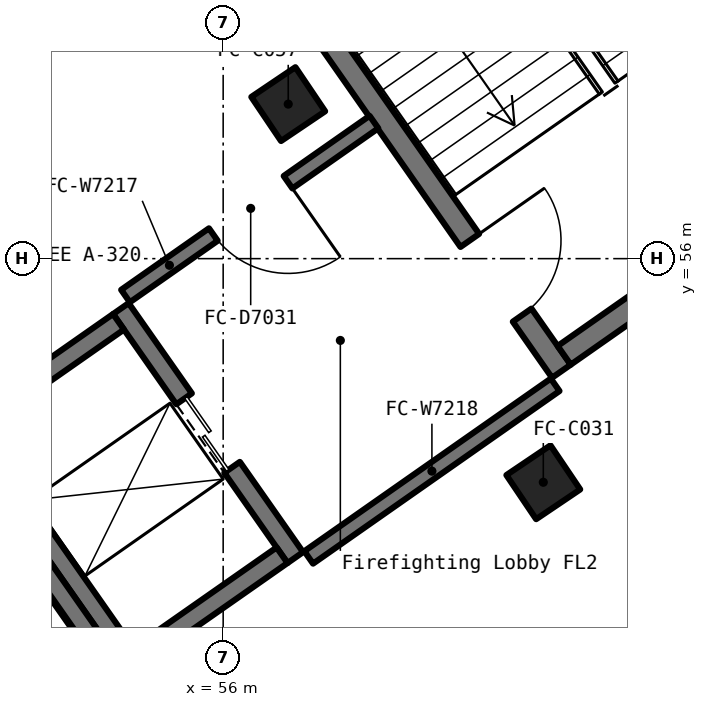
"""IFC4 building model, lengths in metres.
Left out: names, types, materials, properties, quantities, classifications, styles, units other than length and angle.
Written with IfcOpenShell. Run it as: python <this file> out.ifc"""

import sys

from ifc_helpers import new_model, si_unit, direction, frame, frame_2d, origin, origin_2d, place, context, subcontext, project, spatial, rectangle, extrude, element, fill, save


model = new_model("IFC4")
c1 = context("Model", 3, precision=1e-05, world=origin(), true_north=direction((0.0, 1.0)))
c2 = subcontext(c1, "Body", "Model", "MODEL_VIEW")
j1 = project(units=[si_unit("LENGTHUNIT", "METRE"), si_unit("PLANEANGLEUNIT", "RADIAN")], contexts=[c1])
p1 = place(None, origin())
s1 = spatial("IfcSite", under=j1, at=p1, CompositionType="ELEMENT")
p2 = place(p1, origin())
s2 = spatial("IfcBuilding", under=s1, at=p2, CompositionType="ELEMENT")
p3 = place(p2, frame((0.0, 0.0, -6.0)))
s3 = spatial("IfcBuildingStorey", under=s2, at=p3, CompositionType="ELEMENT", Elevation=-6.0)
for number, where, z_axis, x_axis in (
    (1, (60.212, 53.058, 0.0), (0.0, 0.0, 1.0), (0.829, 0.559, 0.0)),
    (2, (56.856, 58.033, 0.0), (0.0, 0.0, 1.0), (0.829, 0.559, 0.0)),
):
    element("IfcColumn", number, at=place(p3, frame(where, z_axis=z_axis, x_axis=x_axis)), inside=s3, PredefinedType="COLUMN", context=c2, shape_type="SweptSolid", body=[
        extrude(rectangle(XDim=0.7, YDim=0.7, at=origin_2d()), origin(), (0.0, 0.0, 1.0), 6.0),
    ])
p4 = place(p3, frame((64.791, 57.559, 0.0), z_axis=(0.0, 0.0, 1.0), x_axis=(-0.573514776444, 0.819195215563, 0.0)))
e3 = element("IfcWall", 3, at=p4, inside=s3, PredefinedType="SOLIDWALL", context=c2, shape_type="SweptSolid", body=[
    extrude(rectangle(XDim=10.0, YDim=0.3, at=frame_2d((5.0, 0.0))), origin(), (0.0, 0.0, 1.0), 6.0),
])
p5 = place(p3, frame((54.714, 62.711, 0.0), z_axis=(0.0, 0.0, 1.0), x_axis=(0.573563925118, -0.819160804606, 0.0)))
e4 = element("IfcWall", 4, at=p5, inside=s3, PredefinedType="SOLIDWALL", context=c2, shape_type="SweptSolid", body=[
    extrude(rectangle(XDim=10.0, YDim=0.3, at=frame_2d((5.0, 0.0))), origin(), (0.0, 0.0, 1.0), 6.0),
])
p6 = place(p5, frame((7.9, 0.0, 0.0)))
e5 = element("IfcOpeningElement", 5, at=p6, cuts=e4, PredefinedType="OPENING", context=c2, shape_type="SweptSolid", body=[
    extrude(rectangle(XDim=1.2, YDim=2.1, at=frame_2d((0.6, 1.05))), frame((0.0, 0.162, 0.0), z_axis=(0.0, -1.0, 0.0), x_axis=(1.0, 0.0, 0.0)), (0.0, 0.0, 1.0), 0.324),
])
p7 = place(p3, frame((60.487, 54.728, 0.0), z_axis=(0.0, 0.0, 1.0), x_axis=(0.819096538389, 0.573655698829, 0.0)))
e6 = element("IfcWall", 6, at=p7, inside=s3, PredefinedType="SOLIDWALL", context=c2, shape_type="SweptSolid", body=[
    extrude(rectangle(XDim=4.999, YDim=0.3, at=frame_2d((2.5, 0.0))), origin(), (0.0, 0.0, 1.0), 6.0),
])
p8 = place(p3, frame((56.949, 52.067, 0.0), z_axis=(0.0, 0.0, 1.0), x_axis=(-0.573736768582, 0.819039755065, 0.0)))
e7 = element("IfcWall", 7, at=p8, inside=s3, PredefinedType="SOLIDWALL", context=c2, shape_type="SweptSolid", body=[
    extrude(rectangle(XDim=4.0, YDim=0.25, at=frame_2d((2.0, 0.0))), origin(), (0.0, 0.0, 1.0), 6.0),
])
p9 = place(p8, frame((1.45, 0.0, 0.0)))
e8 = element("IfcOpeningElement", 8, at=p9, cuts=e7, PredefinedType="OPENING", context=c2, shape_type="SweptSolid", body=[
    extrude(rectangle(XDim=1.1, YDim=2.1, at=frame_2d((0.55, 1.05))), frame((0.0, 0.137, 0.0), z_axis=(0.0, -1.0, 0.0), x_axis=(1.0, 0.0, 0.0)), (0.0, 0.0, 1.0), 0.274),
])
p10 = place(p3, frame((54.623, 55.169, 0.0), z_axis=(0.0, 0.0, 1.0), x_axis=(-0.819226933165, -0.573469469089, 0.0)))
e9 = element("IfcWall", 9, at=p10, inside=s3, PredefinedType="SOLIDWALL", context=c2, shape_type="SweptSolid", body=[
    extrude(rectangle(XDim=2.3, YDim=0.25, at=frame_2d((1.15, 0.0))), origin(), (0.0, 0.0, 1.0), 6.0),
])
p11 = place(p3, frame((52.565, 53.881, 0.0), z_axis=(0.0, 0.0, 1.0), x_axis=(0.573572956461, -0.819154480923, 0.0)))
e10 = element("IfcWall", 10, at=p11, inside=s3, PredefinedType="SOLIDWALL", context=c2, shape_type="SweptSolid", body=[
    extrude(rectangle(XDim=4.0, YDim=0.25, at=frame_2d((2.0, 0.0))), origin(), (0.0, 0.0, 1.0), 6.0),
])
p12 = place(p3, frame((54.89, 50.779, 0.0), z_axis=(0.0, 0.0, 1.0), x_axis=(0.819366508838, 0.573270027295, 0.0)))
e11 = element("IfcWall", 11, at=p12, inside=s3, PredefinedType="SOLIDWALL", context=c2, shape_type="SweptSolid", body=[
    extrude(rectangle(XDim=2.301, YDim=0.25, at=frame_2d((1.15, 0.0))), origin(), (0.0, 0.0, 1.0), 6.0),
])
p13 = place(p3, frame((54.655, 50.461, 0.0), z_axis=(0.0, 0.0, 1.0), x_axis=(-0.573572956461, 0.819154480923, 0.0)))
e12 = element("IfcWall", 12, at=p13, inside=s3, PredefinedType="SOLIDWALL", context=c2, shape_type="SweptSolid", body=[
    extrude(rectangle(XDim=4.0, YDim=0.25, at=frame_2d((2.0, 0.0))), origin(), (0.0, 0.0, 1.0), 6.0),
])
p14 = place(p3, frame((57.984, 57.797, 0.0), z_axis=(0.0, 0.0, 1.0), x_axis=(-0.819125561737, -0.573614255497, 0.0)))
e13 = element("IfcWall", 13, at=p14, inside=s3, PredefinedType="PARTITIONING", context=c2, shape_type="SweptSolid", body=[
    extrude(rectangle(XDim=3.99, YDim=0.2, at=frame_2d((1.995, 0.0))), origin(), (0.0, 0.0, 1.0), 5.78),
])
p15 = place(p14, frame((1.38, 0.0, 0.0)))
e14 = element("IfcOpeningElement", 14, at=p15, cuts=e13, PredefinedType="OPENING", context=c2, shape_type="SweptSolid", body=[
    extrude(rectangle(XDim=1.2, YDim=2.1, at=frame_2d((0.6, 1.05))), frame((0.0, 0.112, 0.0), z_axis=(0.0, -1.0, 0.0), x_axis=(1.0, 0.0, 0.0)), (0.0, 0.0, 1.0), 0.224),
])
p16 = place(p3, frame((57.125, 52.069, 0.0), z_axis=(0.0, 0.0, 1.0), x_axis=(0.81911891796, 0.573623742744, 0.0)))
e15 = element("IfcWall", 15, at=p16, inside=s3, PredefinedType="PARTITIONING", context=c2, shape_type="SweptSolid", body=[
    extrude(rectangle(XDim=3.959, YDim=0.2, at=frame_2d((1.979, 0.0))), origin(), (0.0, 0.0, 1.0), 5.78),
])
p17 = place(p6, origin())
e16 = element("IfcDoor", 16, at=p17, inside=s3, OperationType="SINGLE_SWING_LEFT", PredefinedType="DOOR", context=c2, shape_type="SweptSolid", body=[
    extrude(rectangle(XDim=1.2, YDim=2.1, at=frame_2d((0.6, 1.05))), frame((0.0, 0.025, 0.0), z_axis=(0.0, -1.0, 0.0), x_axis=(1.0, 0.0, 0.0)), (0.0, 0.0, 1.0), 0.05),
])
fill(e5, e16)
p18 = place(p9, origin())
e17 = element("IfcDoor", 17, at=p18, inside=s3, OperationType="DOUBLE_DOOR_SLIDING", PredefinedType="DOOR", context=c2, shape_type="SweptSolid", body=[
    extrude(rectangle(XDim=1.1, YDim=2.1, at=frame_2d((0.55, 1.05))), frame((0.0, 0.025, 0.0), z_axis=(0.0, -1.0, 0.0), x_axis=(1.0, 0.0, 0.0)), (0.0, 0.0, 1.0), 0.05),
])
fill(e8, e17)
p19 = place(p15, origin())
e18 = element("IfcDoor", 18, at=p19, inside=s3, OperationType="SINGLE_SWING_LEFT", PredefinedType="DOOR", context=c2, shape_type="SweptSolid", body=[
    extrude(rectangle(XDim=1.2, YDim=2.1, at=frame_2d((0.6, 1.05))), frame((0.0, 0.025, 0.0), z_axis=(0.0, -1.0, 0.0), x_axis=(1.0, 0.0, 0.0)), (0.0, 0.0, 1.0), 0.05),
])
fill(e14, e18)
save(model, sys.argv[1])
